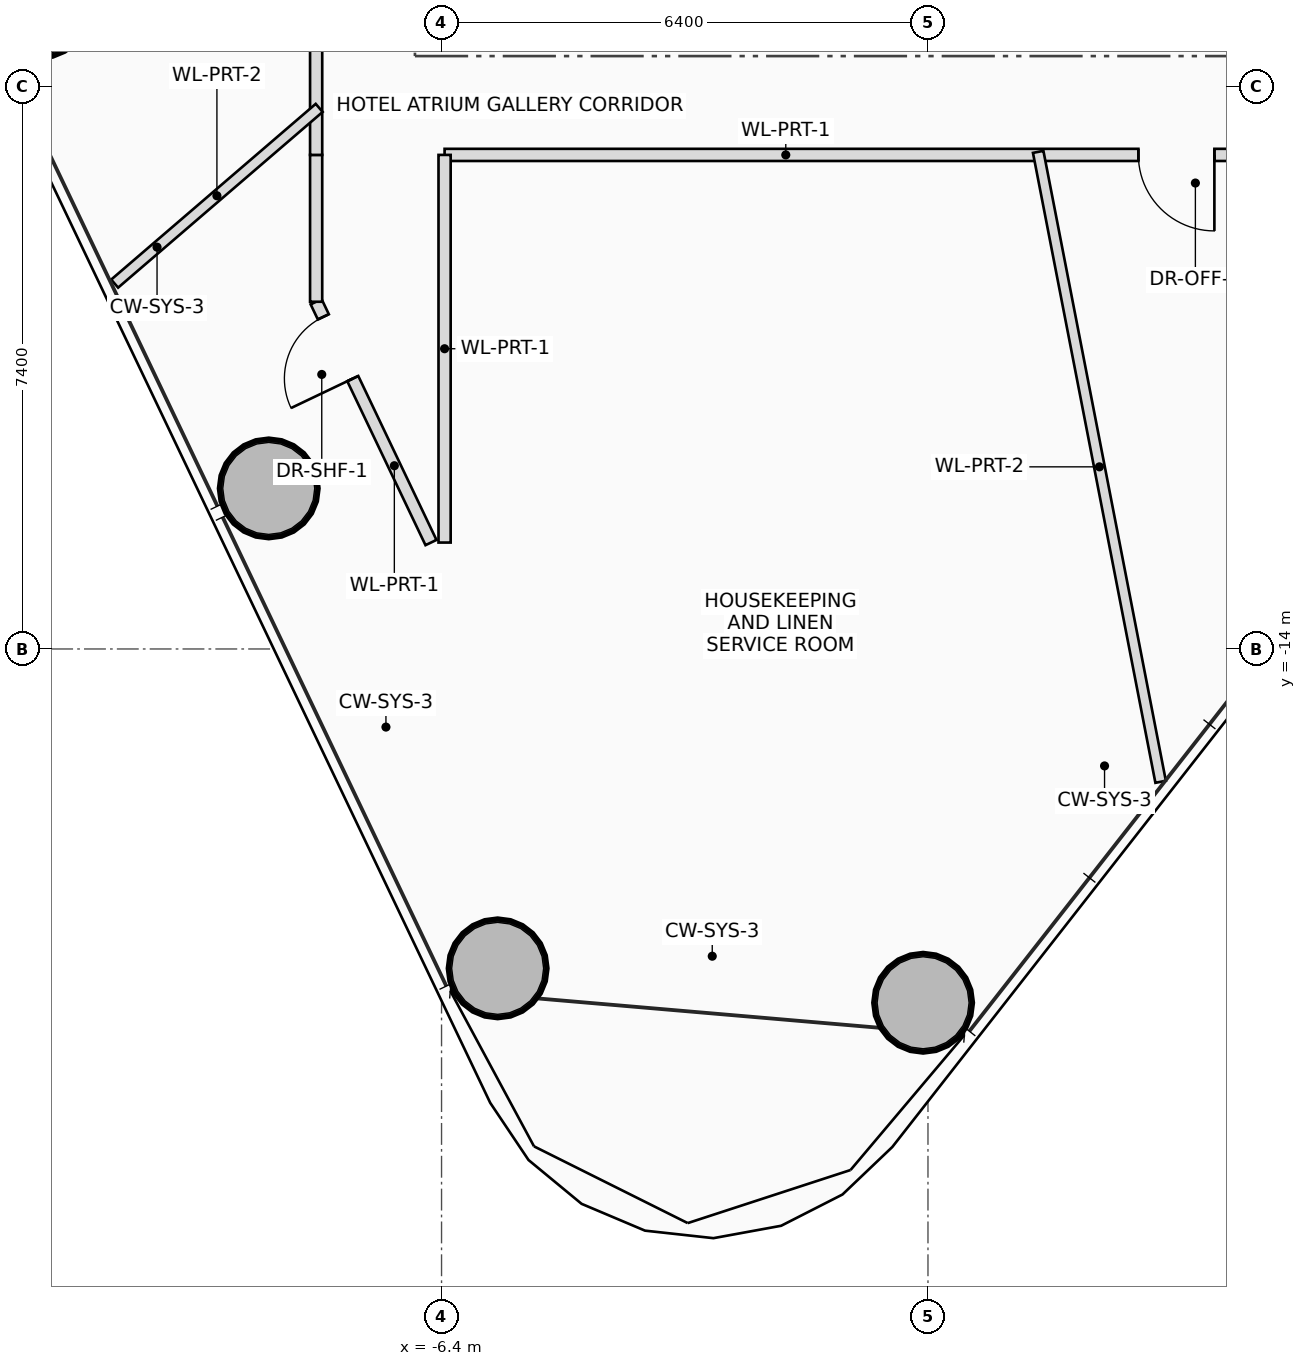
"""IFC4 building model, lengths in metres.
Left out: names, types, materials, properties, quantities, classifications, styles, units other than length and angle.
Written with IfcOpenShell. Run it as: python <this file> out.ifc"""

import sys

from ifc_helpers import new_model, si_unit, direction, frame, frame_2d, origin, origin_2d, place, context, subcontext, project, spatial, rectangle, hollow_circle, extrude, source, transform, mapped, element, fill, save


model = new_model("IFC4")
c1 = context("Model", 3, precision=1e-05, world=origin(), true_north=direction((0.0, 1.0)))
c2 = subcontext(c1, "Body", "Model", "MODEL_VIEW")
j1 = project(units=[si_unit("LENGTHUNIT", "METRE"), si_unit("PLANEANGLEUNIT", "RADIAN")], contexts=[c1])
p1 = place(None, origin())
s1 = spatial("IfcSite", under=j1, at=p1, CompositionType="ELEMENT")
p2 = place(p1, origin())
s2 = spatial("IfcBuilding", under=s1, at=p2, CompositionType="ELEMENT")
p3 = place(p2, frame((0.0, 0.0, 150.2)))
s3 = spatial("IfcBuildingStorey", under=s2, at=p3, CompositionType="ELEMENT", Elevation=150.2)
m1 = source(origin(), c2, "Body", "SweptSolid", [
    extrude(hollow_circle(Radius=0.65, WallThickness=0.045, at=origin_2d()), origin(), (0.0, 0.0, 1.0), 3.45),
])
for number, where, z_axis, x_axis in (
    (1, (-0.064, -18.655, 0.0), (0.0, 0.0, 1.0), (1.0, 0.0, 0.0)),
    (2, (-11.685, -5.573, 0.0), (0.0, 0.0, 1.0), (1.0, 0.0, 0.0)),
    (3, (-8.674, -11.888, 0.0), (0.0, 0.0, 1.0), (1.0, 0.0, 0.0)),
    (4, (-5.662, -18.202, 0.0), (0.0, 0.0, 1.0), (1.0, 0.0, 0.0)),
):
    element("IfcColumn", number, at=place(p3, frame(where, z_axis=z_axis, x_axis=x_axis)), inside=s3, PredefinedType="COLUMN", context=c2, shape_type="MappedRepresentation", body=[
        mapped(m1, transform((0.0, 0.0, 0.0), scale=1.0)),
    ])
p4 = place(p3, frame((-6.539, -12.6, 0.0), z_axis=(0.0, 0.0, 1.0), x_axis=(-0.430527444218, 0.902577486853, 0.0)))
e5 = element("IfcWall", 5, at=p4, inside=s3, PredefinedType="PARTITIONING", context=c2, shape_type="SweptSolid", body=[
    extrude(rectangle(XDim=3.51, YDim=0.16, at=frame_2d((1.755, 0.0))), origin(), (0.0, 0.0, 1.0), 2.565),
])
p5 = place(p4, frame((2.39, 0.0, 0.0)))
e6 = element("IfcOpeningElement", 6, at=p5, cuts=e5, PredefinedType="OPENING", context=c2, shape_type="SweptSolid", body=[
    extrude(rectangle(XDim=0.9, YDim=2.05, at=frame_2d((0.45, 1.025))), frame((0.0, 0.09, 0.0), z_axis=(0.0, -1.0, 0.0), x_axis=(1.0, 0.0, 0.0)), (0.0, 0.0, 1.0), 0.18),
])
p6 = place(p3, frame((-8.05, -9.432, 0.0), z_axis=(0.0, 0.0, 1.0), x_axis=(0.0, 1.0, 0.0)))
e7 = element("IfcWall", 7, at=p6, inside=s3, PredefinedType="PARTITIONING", context=c2, shape_type="SweptSolid", body=[
    extrude(rectangle(XDim=1.932, YDim=0.16, at=frame_2d((0.966, 0.0))), origin(), (0.0, 0.0, 1.0), 2.765),
])
p7 = place(p3, frame((-8.05, -7.5, 0.0), z_axis=(0.0, 0.0, 1.0), x_axis=(0.0, 1.0, 0.0)))
e8 = element("IfcWall", 8, at=p7, inside=s3, PredefinedType="PARTITIONING", context=c2, shape_type="SweptSolid", body=[
    extrude(rectangle(XDim=15.0, YDim=0.16, at=frame_2d((7.5, 0.0))), origin(), (0.0, 0.0, 1.0), 2.565),
])
p8 = place(p7, frame((7.0, 0.0, 0.0)))
e9 = element("IfcOpeningElement", 9, at=p8, cuts=e8, PredefinedType="OPENING", context=c2, shape_type="SweptSolid", body=[
    extrude(rectangle(XDim=1.0, YDim=2.25, at=frame_2d((0.5, 1.125))), frame((0.0, 0.09, 0.0), z_axis=(0.0, -1.0, 0.0), x_axis=(1.0, 0.0, 0.0)), (0.0, 0.0, 1.0), 0.18),
])
p9 = place(p3, frame((5.25, -7.5, 0.0), z_axis=(0.0, 0.0, 1.0), x_axis=(-1.0, 0.0, 0.0)))
e10 = element("IfcWall", 10, at=p9, inside=s3, PredefinedType="PARTITIONING", context=c2, shape_type="SweptSolid", body=[
    extrude(rectangle(XDim=11.61, YDim=0.16, at=frame_2d((5.805, 0.0))), origin(), (0.0, 0.0, 1.0), 2.565),
])
p10 = place(p9, frame((1.482, 0.0, 0.0)))
e11 = element("IfcOpeningElement", 11, at=p10, cuts=e10, PredefinedType="OPENING", context=c2, shape_type="SweptSolid", body=[
    extrude(rectangle(XDim=1.0, YDim=2.25, at=frame_2d((0.5, 1.125))), frame((0.0, 0.09, 0.0), z_axis=(0.0, -1.0, 0.0), x_axis=(1.0, 0.0, 0.0)), (0.0, 0.0, 1.0), 0.18),
])
p11 = place(p3, frame((-6.36, -7.5, 0.0), z_axis=(0.0, 0.0, 1.0), x_axis=(0.0, -1.0, 0.0)))
e12 = element("IfcWall", 12, at=p11, inside=s3, PredefinedType="PARTITIONING", context=c2, shape_type="SweptSolid", body=[
    extrude(rectangle(XDim=5.1, YDim=0.16, at=frame_2d((2.55, 0.0))), origin(), (0.0, 0.0, 1.0), 3.21),
])
p12 = place(p3, frame((-8.01, -6.882, 0.0), z_axis=(0.0, 0.0, 1.0), x_axis=(-0.75852259091, -0.651646744087, 0.0)))
e13 = element("IfcWall", 13, at=p12, inside=s3, PredefinedType="PARTITIONING", context=c2, shape_type="SweptSolid", body=[
    extrude(rectangle(XDim=3.548, YDim=0.14, at=frame_2d((1.774, 0.0))), origin(), (0.0, 0.0, 1.0), 2.725),
])
p13 = place(p3, frame((1.45, -7.46, 0.0), z_axis=(0.0, 0.0, 1.0), x_axis=(0.190791487028, -0.981630586564, 0.0)))
e14 = element("IfcWall", 14, at=p13, inside=s3, PredefinedType="PARTITIONING", context=c2, shape_type="SweptSolid", body=[
    extrude(rectangle(XDim=8.443, YDim=0.14, at=frame_2d((4.221, 0.0))), origin(), (0.0, 0.0, 1.0), 2.725),
])
p14 = place(p5, origin())
e15 = element("IfcDoor", 15, at=p14, inside=s3, OperationType="SINGLE_SWING_LEFT", PredefinedType="DOOR", context=c2, shape_type="SweptSolid", body=[
    extrude(rectangle(XDim=0.9, YDim=2.05, at=frame_2d((0.45, 1.025))), frame((0.0, 0.025, 0.0), z_axis=(0.0, -1.0, 0.0), x_axis=(1.0, 0.0, 0.0)), (0.0, 0.0, 1.0), 0.05),
])
fill(e6, e15)
p15 = place(p10, origin())
e16 = element("IfcDoor", 16, at=p15, inside=s3, OperationType="SINGLE_SWING_LEFT", PredefinedType="DOOR", context=c2, shape_type="SweptSolid", body=[
    extrude(rectangle(XDim=1.0, YDim=2.25, at=frame_2d((0.5, 1.125))), frame((0.0, 0.025, 0.0), z_axis=(0.0, -1.0, 0.0), x_axis=(1.0, 0.0, 0.0)), (0.0, 0.0, 1.0), 0.05),
])
fill(e11, e16)
save(model, sys.argv[1])
